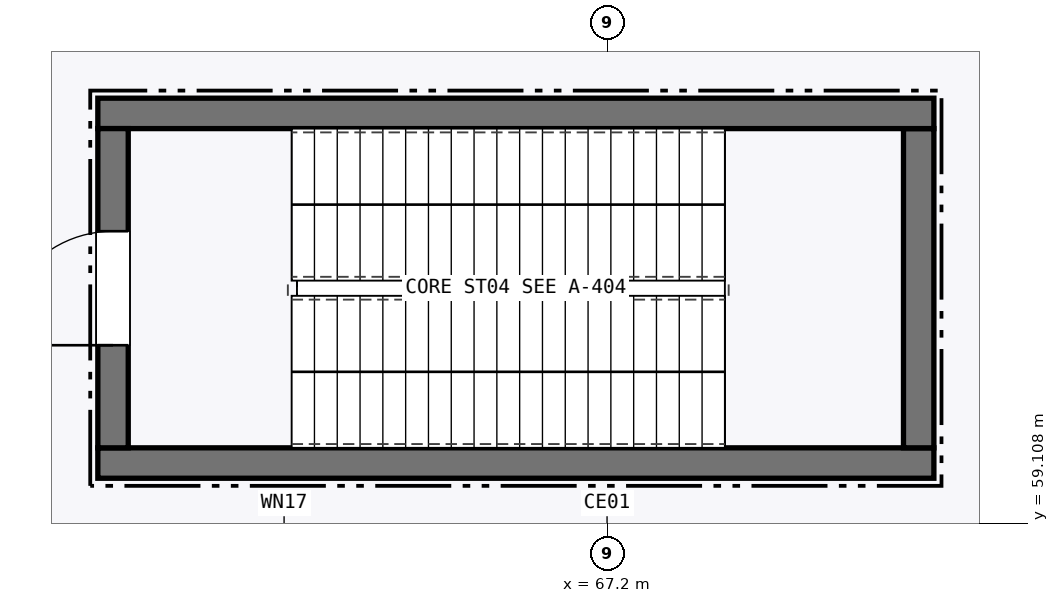
"""IFC4 building model, lengths in metres.
Left out: names, types, materials, properties, quantities, classifications, styles, units other than length and angle.
Written with IfcOpenShell. Run it as: python <this file> out.ifc"""

import sys

from ifc_helpers import new_model, si_unit, direction, frame, frame_2d, origin, place, context, subcontext, project, spatial, rectangle, extrude, element, fill, save


model = new_model("IFC4")
c1 = context("Model", 3, precision=1e-05, world=origin(), true_north=direction((0.0, 1.0)))
c2 = subcontext(c1, "Body", "Model", "MODEL_VIEW")
j1 = project(units=[si_unit("LENGTHUNIT", "METRE"), si_unit("PLANEANGLEUNIT", "RADIAN")], contexts=[c1])
p1 = place(None, origin())
s1 = spatial("IfcSite", under=j1, at=p1, CompositionType="ELEMENT")
p2 = place(p1, origin())
s2 = spatial("IfcBuilding", under=s1, at=p2, CompositionType="ELEMENT")
p3 = place(p2, origin())
s3 = spatial("IfcBuildingStorey", under=s2, at=p3, CompositionType="ELEMENT", Elevation=0.0)
p4 = place(p3, frame((60.5, 59.9, 0.0), z_axis=(0.0, 0.0, 1.0), x_axis=(1.0, 0.0, 0.0)))
e1 = element("IfcWall", 1, at=p4, inside=s3, PredefinedType="SHEAR", context=c2, shape_type="SweptSolid", body=[
    extrude(rectangle(XDim=11.0, YDim=0.4, at=frame_2d((5.5, 0.0))), origin(), (0.0, 0.0, 1.0), 5.745),
])
p5 = place(p3, frame((71.3, 60.1, 0.0), z_axis=(0.0, 0.0, 1.0), x_axis=(0.0, 1.0, 0.0)))
e2 = element("IfcWall", 2, at=p5, inside=s3, PredefinedType="SHEAR", context=c2, shape_type="SweptSolid", body=[
    extrude(rectangle(XDim=4.2, YDim=0.4, at=frame_2d((2.1, 0.0))), origin(), (0.0, 0.0, 1.0), 5.745),
])
p6 = place(p3, frame((71.5, 64.5, 0.0), z_axis=(0.0, 0.0, 1.0), x_axis=(-1.0, 0.0, 0.0)))
e3 = element("IfcWall", 3, at=p6, inside=s3, PredefinedType="SHEAR", context=c2, shape_type="SweptSolid", body=[
    extrude(rectangle(XDim=11.0, YDim=0.4, at=frame_2d((5.5, 0.0))), origin(), (0.0, 0.0, 1.0), 5.745),
])
p7 = place(p3, frame((60.7, 64.3, 0.0), z_axis=(0.0, 0.0, 1.0), x_axis=(0.0, -1.0, 0.0)))
e4 = element("IfcWall", 4, at=p7, inside=s3, PredefinedType="SHEAR", context=c2, shape_type="SweptSolid", body=[
    extrude(rectangle(XDim=4.2, YDim=0.4, at=frame_2d((2.1, 0.0))), origin(), (0.0, 0.0, 1.0), 5.745),
])
p8 = place(p7, frame((1.35, 0.0, 0.0)))
e5 = element("IfcOpeningElement", 5, at=p8, cuts=e4, PredefinedType="OPENING", context=c2, shape_type="SweptSolid", body=[
    extrude(rectangle(XDim=1.5, YDim=2.15, at=frame_2d((0.75, 1.075))), frame((0.0, 0.21, 0.0), z_axis=(0.0, -1.0, 0.0), x_axis=(1.0, 0.0, 0.0)), (0.0, 0.0, 1.0), 0.42),
])
p9 = place(p8, frame((1.5, 0.0, 0.0), z_axis=(0.0, 0.0, 1.0), x_axis=(-1.0, 0.0, 0.0)))
e6 = element("IfcDoor", 6, at=p9, inside=s3, OperationType="SINGLE_SWING_RIGHT", PredefinedType="DOOR", context=c2, shape_type="SweptSolid", body=[
    extrude(rectangle(XDim=1.5, YDim=2.15, at=frame_2d((0.75, 1.075))), frame((0.0, 0.025, 0.0), z_axis=(0.0, -1.0, 0.0), x_axis=(1.0, 0.0, 0.0)), (0.0, 0.0, 1.0), 0.05),
])
fill(e5, e6)
save(model, sys.argv[1])
